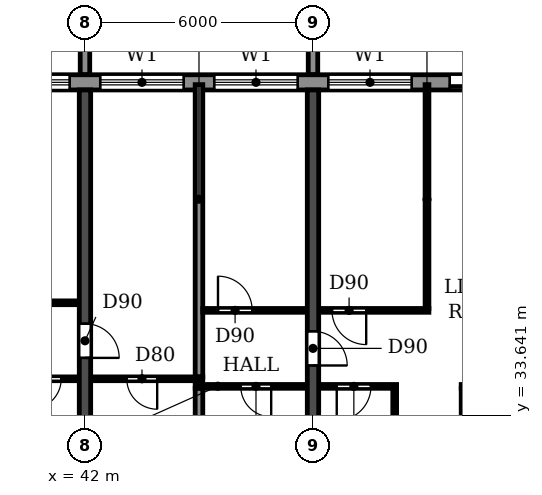
"""IFC4 building model, lengths in metres.
Left out: names, types, materials, properties, quantities, classifications, styles, units other than length and angle.
Written with IfcOpenShell. Run it as: python <this file> out.ifc"""

import sys

from ifc_helpers import new_model, si_unit, direction, frame, frame_2d, origin, place, context, subcontext, project, spatial, polyline, rectangle, outline, extrude, source, transform, mapped, element, fill, save


model = new_model("IFC4")
c1 = context("Model", 3, precision=1e-05, world=origin(), true_north=direction((0.0, 1.0)))
c2 = subcontext(c1, "Body", "Model", "MODEL_VIEW")
j1 = project(units=[si_unit("LENGTHUNIT", "METRE"), si_unit("PLANEANGLEUNIT", "RADIAN")], contexts=[c1])
p1 = place(None, origin())
s1 = spatial("IfcSite", under=j1, at=p1, CompositionType="ELEMENT")
p2 = place(p1, origin())
s2 = spatial("IfcBuilding", under=s1, at=p2, CompositionType="ELEMENT")
p3 = place(p2, frame((0.0, 0.0, 142.2)))
s3 = spatial("IfcBuildingStorey", under=s2, at=p3, CompositionType="ELEMENT", Elevation=142.2)
p4 = place(p3, frame((42.0, 30.525, 0.0), z_axis=(0.0, 0.0, 1.0), x_axis=(0.0, 1.0, 0.0)))
e1 = element("IfcWall", 1, at=p4, inside=s3, PredefinedType="SHEAR", context=c2, shape_type="SweptSolid", body=[
    extrude(rectangle(XDim=11.675, YDim=0.3, at=frame_2d((5.837, 0.0))), origin(), (0.0, 0.0, 1.0), 3.07),
])
p5 = place(p4, frame((4.625, 0.0, 0.0)))
e2 = element("IfcOpeningElement", 2, at=p5, cuts=e1, PredefinedType="OPENING", context=c2, shape_type="SweptSolid", body=[
    extrude(rectangle(XDim=0.9, YDim=2.1, at=frame_2d((0.45, 1.05))), frame((0.0, 0.16, 0.0), z_axis=(0.0, -1.0, 0.0), x_axis=(1.0, 0.0, 0.0)), (0.0, 0.0, 1.0), 0.32),
])
p6 = place(p3, frame((48.0, 30.525, 0.0), z_axis=(0.0, 0.0, 1.0), x_axis=(0.0, 1.0, 0.0)))
e3 = element("IfcWall", 3, at=p6, inside=s3, PredefinedType="SHEAR", context=c2, shape_type="SweptSolid", body=[
    extrude(rectangle(XDim=11.675, YDim=0.3, at=frame_2d((5.837, 0.0))), origin(), (0.0, 0.0, 1.0), 3.07),
])
p7 = place(p6, frame((4.425, 0.0, 0.0)))
e4 = element("IfcOpeningElement", 4, at=p7, cuts=e3, PredefinedType="OPENING", context=c2, shape_type="SweptSolid", body=[
    extrude(rectangle(XDim=0.9, YDim=2.1, at=frame_2d((0.45, 1.05))), frame((0.0, 0.16, 0.0), z_axis=(0.0, -1.0, 0.0), x_axis=(1.0, 0.0, 0.0)), (0.0, 0.0, 1.0), 0.32),
])
p8 = place(p3, frame((85.317, 42.4, 0.0), z_axis=(0.0, 0.0, 1.0), x_axis=(-1.0, 0.0, 0.0)))
e5 = element("IfcWall", 5, at=p8, inside=s3, PredefinedType="STANDARD", context=c2, shape_type="SweptSolid", body=[
    extrude(rectangle(XDim=68.634, YDim=0.4, at=frame_2d((34.317, 0.0))), origin(), (0.0, 0.0, 1.0), 3.07),
])
p9 = place(p8, frame((64.717, 0.0, 0.9)))
e6 = element("IfcOpeningElement", 6, at=p9, cuts=e5, PredefinedType="OPENING", context=c2, shape_type="SweptSolid", body=[
    extrude(rectangle(XDim=2.2, YDim=1.5, at=frame_2d((1.1, 0.75))), frame((0.0, 0.21, 0.0), z_axis=(0.0, -1.0, 0.0), x_axis=(1.0, 0.0, 0.0)), (0.0, 0.0, 1.0), 0.42),
])
p10 = place(p8, frame((61.917, 0.0, 0.0)))
e7 = element("IfcOpeningElement", 7, at=p10, cuts=e5, PredefinedType="OPENING", context=c2, shape_type="SweptSolid", body=[
    extrude(rectangle(XDim=1.8, YDim=2.4, at=frame_2d((0.9, 1.2))), frame((0.0, 0.21, 0.0), z_axis=(0.0, -1.0, 0.0), x_axis=(1.0, 0.0, 0.0)), (0.0, 0.0, 1.0), 0.42),
])
p11 = place(p8, frame((58.717, 0.0, 0.9)))
e8 = element("IfcOpeningElement", 8, at=p11, cuts=e5, PredefinedType="OPENING", context=c2, shape_type="SweptSolid", body=[
    extrude(rectangle(XDim=2.2, YDim=1.5, at=frame_2d((1.1, 0.75))), frame((0.0, 0.21, 0.0), z_axis=(0.0, -1.0, 0.0), x_axis=(1.0, 0.0, 0.0)), (0.0, 0.0, 1.0), 0.42),
])
p12 = place(p8, frame((55.917, 0.0, 0.0)))
e9 = element("IfcOpeningElement", 9, at=p12, cuts=e5, PredefinedType="OPENING", context=c2, shape_type="SweptSolid", body=[
    extrude(rectangle(XDim=1.8, YDim=2.4, at=frame_2d((0.9, 1.2))), frame((0.0, 0.21, 0.0), z_axis=(0.0, -1.0, 0.0), x_axis=(1.0, 0.0, 0.0)), (0.0, 0.0, 1.0), 0.42),
])
p13 = place(p8, frame((52.717, 0.0, 0.9)))
e10 = element("IfcOpeningElement", 10, at=p13, cuts=e5, PredefinedType="OPENING", context=c2, shape_type="SweptSolid", body=[
    extrude(rectangle(XDim=2.2, YDim=1.5, at=frame_2d((1.1, 0.75))), frame((0.0, 0.21, 0.0), z_axis=(0.0, -1.0, 0.0), x_axis=(1.0, 0.0, 0.0)), (0.0, 0.0, 1.0), 0.42),
])
p14 = place(p8, frame((49.717, 0.0, 0.9)))
e11 = element("IfcOpeningElement", 11, at=p14, cuts=e5, PredefinedType="OPENING", context=c2, shape_type="SweptSolid", body=[
    extrude(rectangle(XDim=2.2, YDim=1.5, at=frame_2d((1.1, 0.75))), frame((0.0, 0.21, 0.0), z_axis=(0.0, -1.0, 0.0), x_axis=(1.0, 0.0, 0.0)), (0.0, 0.0, 1.0), 0.42),
])
p15 = place(p8, frame((46.917, 0.0, 0.0)))
e12 = element("IfcOpeningElement", 12, at=p15, cuts=e5, PredefinedType="OPENING", context=c2, shape_type="SweptSolid", body=[
    extrude(rectangle(XDim=1.8, YDim=2.4, at=frame_2d((0.9, 1.2))), frame((0.0, 0.21, 0.0), z_axis=(0.0, -1.0, 0.0), x_axis=(1.0, 0.0, 0.0)), (0.0, 0.0, 1.0), 0.42),
])
p16 = place(p8, frame((43.717, 0.0, 0.9)))
e13 = element("IfcOpeningElement", 13, at=p16, cuts=e5, PredefinedType="OPENING", context=c2, shape_type="SweptSolid", body=[
    extrude(rectangle(XDim=2.2, YDim=1.5, at=frame_2d((1.1, 0.75))), frame((0.0, 0.21, 0.0), z_axis=(0.0, -1.0, 0.0), x_axis=(1.0, 0.0, 0.0)), (0.0, 0.0, 1.0), 0.42),
])
p17 = place(p8, frame((40.717, 0.0, 0.9)))
e14 = element("IfcOpeningElement", 14, at=p17, cuts=e5, PredefinedType="OPENING", context=c2, shape_type="SweptSolid", body=[
    extrude(rectangle(XDim=2.2, YDim=1.5, at=frame_2d((1.1, 0.75))), frame((0.0, 0.21, 0.0), z_axis=(0.0, -1.0, 0.0), x_axis=(1.0, 0.0, 0.0)), (0.0, 0.0, 1.0), 0.42),
])
p18 = place(p8, frame((37.717, 0.0, 0.9)))
e15 = element("IfcOpeningElement", 15, at=p18, cuts=e5, PredefinedType="OPENING", context=c2, shape_type="SweptSolid", body=[
    extrude(rectangle(XDim=2.2, YDim=1.5, at=frame_2d((1.1, 0.75))), frame((0.0, 0.21, 0.0), z_axis=(0.0, -1.0, 0.0), x_axis=(1.0, 0.0, 0.0)), (0.0, 0.0, 1.0), 0.42),
])
p19 = place(p8, frame((34.717, 0.0, 0.9)))
e16 = element("IfcOpeningElement", 16, at=p19, cuts=e5, PredefinedType="OPENING", context=c2, shape_type="SweptSolid", body=[
    extrude(rectangle(XDim=2.2, YDim=1.5, at=frame_2d((1.1, 0.75))), frame((0.0, 0.21, 0.0), z_axis=(0.0, -1.0, 0.0), x_axis=(1.0, 0.0, 0.0)), (0.0, 0.0, 1.0), 0.42),
])
p20 = place(p8, frame((31.917, 0.0, 0.0)))
e17 = element("IfcOpeningElement", 17, at=p20, cuts=e5, PredefinedType="OPENING", context=c2, shape_type="SweptSolid", body=[
    extrude(rectangle(XDim=1.8, YDim=2.4, at=frame_2d((0.9, 1.2))), frame((0.0, 0.21, 0.0), z_axis=(0.0, -1.0, 0.0), x_axis=(1.0, 0.0, 0.0)), (0.0, 0.0, 1.0), 0.42),
])
p21 = place(p8, frame((28.917, 0.0, 0.0)))
e18 = element("IfcOpeningElement", 18, at=p21, cuts=e5, PredefinedType="OPENING", context=c2, shape_type="SweptSolid", body=[
    extrude(rectangle(XDim=1.8, YDim=2.4, at=frame_2d((0.9, 1.2))), frame((0.0, 0.21, 0.0), z_axis=(0.0, -1.0, 0.0), x_axis=(1.0, 0.0, 0.0)), (0.0, 0.0, 1.0), 0.42),
])
p22 = place(p8, frame((25.717, 0.0, 0.9)))
e19 = element("IfcOpeningElement", 19, at=p22, cuts=e5, PredefinedType="OPENING", context=c2, shape_type="SweptSolid", body=[
    extrude(rectangle(XDim=2.2, YDim=1.5, at=frame_2d((1.1, 0.75))), frame((0.0, 0.21, 0.0), z_axis=(0.0, -1.0, 0.0), x_axis=(1.0, 0.0, 0.0)), (0.0, 0.0, 1.0), 0.42),
])
p23 = place(p8, frame((22.717, 0.0, 0.9)))
e20 = element("IfcOpeningElement", 20, at=p23, cuts=e5, PredefinedType="OPENING", context=c2, shape_type="SweptSolid", body=[
    extrude(rectangle(XDim=2.2, YDim=1.5, at=frame_2d((1.1, 0.75))), frame((0.0, 0.21, 0.0), z_axis=(0.0, -1.0, 0.0), x_axis=(1.0, 0.0, 0.0)), (0.0, 0.0, 1.0), 0.42),
])
p24 = place(p8, frame((19.717, 0.0, 0.9)))
e21 = element("IfcOpeningElement", 21, at=p24, cuts=e5, PredefinedType="OPENING", context=c2, shape_type="SweptSolid", body=[
    extrude(rectangle(XDim=2.2, YDim=1.5, at=frame_2d((1.1, 0.75))), frame((0.0, 0.21, 0.0), z_axis=(0.0, -1.0, 0.0), x_axis=(1.0, 0.0, 0.0)), (0.0, 0.0, 1.0), 0.42),
])
p25 = place(p8, frame((16.717, 0.0, 0.9)))
e22 = element("IfcOpeningElement", 22, at=p25, cuts=e5, PredefinedType="OPENING", context=c2, shape_type="SweptSolid", body=[
    extrude(rectangle(XDim=2.2, YDim=1.5, at=frame_2d((1.1, 0.75))), frame((0.0, 0.21, 0.0), z_axis=(0.0, -1.0, 0.0), x_axis=(1.0, 0.0, 0.0)), (0.0, 0.0, 1.0), 0.42),
])
p26 = place(p8, frame((13.917, 0.0, 0.0)))
e23 = element("IfcOpeningElement", 23, at=p26, cuts=e5, PredefinedType="OPENING", context=c2, shape_type="SweptSolid", body=[
    extrude(rectangle(XDim=1.8, YDim=2.4, at=frame_2d((0.9, 1.2))), frame((0.0, 0.21, 0.0), z_axis=(0.0, -1.0, 0.0), x_axis=(1.0, 0.0, 0.0)), (0.0, 0.0, 1.0), 0.42),
])
p27 = place(p8, frame((10.917, 0.0, 0.0)))
e24 = element("IfcOpeningElement", 24, at=p27, cuts=e5, PredefinedType="OPENING", context=c2, shape_type="SweptSolid", body=[
    extrude(rectangle(XDim=1.8, YDim=2.4, at=frame_2d((0.9, 1.2))), frame((0.0, 0.21, 0.0), z_axis=(0.0, -1.0, 0.0), x_axis=(1.0, 0.0, 0.0)), (0.0, 0.0, 1.0), 0.42),
])
p28 = place(p8, frame((7.717, 0.0, 0.9)))
e25 = element("IfcOpeningElement", 25, at=p28, cuts=e5, PredefinedType="OPENING", context=c2, shape_type="SweptSolid", body=[
    extrude(rectangle(XDim=2.2, YDim=1.5, at=frame_2d((1.1, 0.75))), frame((0.0, 0.21, 0.0), z_axis=(0.0, -1.0, 0.0), x_axis=(1.0, 0.0, 0.0)), (0.0, 0.0, 1.0), 0.42),
])
p29 = place(p8, frame((4.717, 0.0, 0.9)))
e26 = element("IfcOpeningElement", 26, at=p29, cuts=e5, PredefinedType="OPENING", context=c2, shape_type="SweptSolid", body=[
    extrude(rectangle(XDim=2.2, YDim=1.5, at=frame_2d((1.1, 0.75))), frame((0.0, 0.21, 0.0), z_axis=(0.0, -1.0, 0.0), x_axis=(1.0, 0.0, 0.0)), (0.0, 0.0, 1.0), 0.42),
])
p30 = place(p8, frame((1.917, 0.0, 0.0)))
e27 = element("IfcOpeningElement", 27, at=p30, cuts=e5, PredefinedType="OPENING", context=c2, shape_type="SweptSolid", body=[
    extrude(rectangle(XDim=1.8, YDim=2.4, at=frame_2d((0.9, 1.2))), frame((0.0, 0.21, 0.0), z_axis=(0.0, -1.0, 0.0), x_axis=(1.0, 0.0, 0.0)), (0.0, 0.0, 1.0), 0.42),
])
m1 = source(origin(), c2, "Body", "SweptSolid", [
    extrude(outline(polyline([(0.0, 0.0), (0.25, 0.0), (0.25, 3.1), (0.0, 3.1), (0.0, 0.0)])), origin(), (0.0, 0.0, 1.0), 3.1),
])
for number, where in (
    (28, (41.875, 42.6, 0.0)),
    (29, (47.875, 42.6, 0.0)),
):
    element("IfcWall", number, at=place(p3, frame(where)), inside=s3, PredefinedType="STANDARD", context=c2, shape_type="MappedRepresentation", body=[
        mapped(m1, transform((0.0, 0.0, 0.0))),
    ])
p31 = place(p3, frame((45.0, 30.535, 0.0), z_axis=(0.0, 0.0, 1.0), x_axis=(0.0, 1.0, 0.0)))
e30 = element("IfcWall", 30, at=p31, inside=s3, PredefinedType="PARTITIONING", context=c2, shape_type="SweptSolid", body=[
    extrude(rectangle(XDim=3.815, YDim=0.2, at=frame_2d((1.908, 0.0))), origin(), (0.0, 0.0, 1.0), 3.07),
])
p32 = place(p3, frame((45.0, 34.65, 0.0), z_axis=(0.0, 0.0, 1.0), x_axis=(0.0, 1.0, 0.0)))
e31 = element("IfcWall", 31, at=p32, inside=s3, PredefinedType="PARTITIONING", context=c2, shape_type="SweptSolid", body=[
    extrude(rectangle(XDim=7.69, YDim=0.2, at=frame_2d((3.845, 0.0))), origin(), (0.0, 0.0, 1.0), 3.07),
])
p33 = place(p3, frame((44.9, 34.4, 0.0), z_axis=(0.0, 0.0, 1.0), x_axis=(1.0, 0.0, 0.0)))
e32 = element("IfcWall", 32, at=p33, inside=s3, PredefinedType="PARTITIONING", context=c2, shape_type="SweptSolid", body=[
    extrude(rectangle(XDim=2.94, YDim=0.1, at=frame_2d((1.47, 0.0))), origin(), (0.0, 0.0, 1.0), 3.07),
])
p34 = place(p33, frame((1.2, 0.0, 0.0)))
e33 = element("IfcOpeningElement", 33, at=p34, cuts=e32, PredefinedType="OPENING", context=c2, shape_type="SweptSolid", body=[
    extrude(rectangle(XDim=0.8, YDim=2.1, at=frame_2d((0.4, 1.05))), frame((0.0, 0.06, 0.0), z_axis=(0.0, -1.0, 0.0), x_axis=(1.0, 0.0, 0.0)), (0.0, 0.0, 1.0), 0.12),
])
p35 = place(p3, frame((48.16, 34.4, 0.0), z_axis=(0.0, 0.0, 1.0), x_axis=(1.0, 0.0, 0.0)))
e34 = element("IfcWall", 34, at=p35, inside=s3, PredefinedType="PARTITIONING", context=c2, shape_type="SweptSolid", body=[
    extrude(rectangle(XDim=2.04, YDim=0.1, at=frame_2d((1.02, 0.0))), origin(), (0.0, 0.0, 1.0), 3.07),
])
p36 = place(p35, frame((0.465, 0.0, 0.0)))
e35 = element("IfcOpeningElement", 35, at=p36, cuts=e34, PredefinedType="OPENING", context=c2, shape_type="SweptSolid", body=[
    extrude(rectangle(XDim=0.9, YDim=2.1, at=frame_2d((0.45, 1.05))), frame((0.0, 0.06, 0.0), z_axis=(0.0, -1.0, 0.0), x_axis=(1.0, 0.0, 0.0)), (0.0, 0.0, 1.0), 0.12),
])
p37 = place(p3, frame((51.9, 34.4, 0.0), z_axis=(0.0, 0.0, 1.0), x_axis=(1.0, 0.0, 0.0)))
e36 = element("IfcWall", 36, at=p37, inside=s3, PredefinedType="PARTITIONING", context=c2, shape_type="SweptSolid", body=[
    extrude(rectangle(XDim=1.94, YDim=0.1, at=frame_2d((0.97, 0.0))), origin(), (0.0, 0.0, 1.0), 3.07),
])
p38 = place(p37, frame((0.675, 0.0, 0.0)))
e37 = element("IfcOpeningElement", 37, at=p38, cuts=e36, PredefinedType="OPENING", context=c2, shape_type="SweptSolid", body=[
    extrude(rectangle(XDim=0.8, YDim=2.1, at=frame_2d((0.4, 1.05))), frame((0.0, 0.06, 0.0), z_axis=(0.0, -1.0, 0.0), x_axis=(1.0, 0.0, 0.0)), (0.0, 0.0, 1.0), 0.12),
])
p39 = place(p3, frame((39.9, 34.6, 0.0), z_axis=(0.0, 0.0, 1.0), x_axis=(1.0, 0.0, 0.0)))
e38 = element("IfcWall", 38, at=p39, inside=s3, PredefinedType="PARTITIONING", context=c2, shape_type="SweptSolid", body=[
    extrude(rectangle(XDim=1.94, YDim=0.1, at=frame_2d((0.97, 0.0))), origin(), (0.0, 0.0, 1.0), 3.07),
])
p40 = place(p39, frame((0.675, 0.0, 0.0)))
e39 = element("IfcOpeningElement", 39, at=p40, cuts=e38, PredefinedType="OPENING", context=c2, shape_type="SweptSolid", body=[
    extrude(rectangle(XDim=0.8, YDim=2.1, at=frame_2d((0.4, 1.05))), frame((0.0, 0.06, 0.0), z_axis=(0.0, -1.0, 0.0), x_axis=(1.0, 0.0, 0.0)), (0.0, 0.0, 1.0), 0.12),
])
p41 = place(p3, frame((42.16, 34.6, 0.0), z_axis=(0.0, 0.0, 1.0), x_axis=(1.0, 0.0, 0.0)))
e40 = element("IfcWall", 40, at=p41, inside=s3, PredefinedType="PARTITIONING", context=c2, shape_type="SweptSolid", body=[
    extrude(rectangle(XDim=2.94, YDim=0.1, at=frame_2d((1.47, 0.0))), origin(), (0.0, 0.0, 1.0), 3.07),
])
p42 = place(p41, frame((0.94, 0.0, 0.0)))
e41 = element("IfcOpeningElement", 41, at=p42, cuts=e40, PredefinedType="OPENING", context=c2, shape_type="SweptSolid", body=[
    extrude(rectangle(XDim=0.8, YDim=2.1, at=frame_2d((0.4, 1.05))), frame((0.0, 0.06, 0.0), z_axis=(0.0, -1.0, 0.0), x_axis=(1.0, 0.0, 0.0)), (0.0, 0.0, 1.0), 0.12),
])
p43 = place(p3, frame((45.1, 36.4, 0.0), z_axis=(0.0, 0.0, 1.0), x_axis=(1.0, 0.0, 0.0)))
e42 = element("IfcWall", 42, at=p43, inside=s3, PredefinedType="PARTITIONING", context=c2, shape_type="SweptSolid", body=[
    extrude(rectangle(XDim=2.74, YDim=0.1, at=frame_2d((1.37, 0.0))), origin(), (0.0, 0.0, 1.0), 3.07),
])
p44 = place(p43, frame((0.4, 0.0, 0.0)))
e43 = element("IfcOpeningElement", 43, at=p44, cuts=e42, PredefinedType="OPENING", context=c2, shape_type="SweptSolid", body=[
    extrude(rectangle(XDim=0.9, YDim=2.1, at=frame_2d((0.45, 1.05))), frame((0.0, 0.06, 0.0), z_axis=(0.0, -1.0, 0.0), x_axis=(1.0, 0.0, 0.0)), (0.0, 0.0, 1.0), 0.12),
])
p45 = place(p3, frame((48.16, 36.4, 0.0), z_axis=(0.0, 0.0, 1.0), x_axis=(1.0, 0.0, 0.0)))
e44 = element("IfcWall", 44, at=p45, inside=s3, PredefinedType="PARTITIONING", context=c2, shape_type="SweptSolid", body=[
    extrude(rectangle(XDim=2.89, YDim=0.1, at=frame_2d((1.445, 0.0))), origin(), (0.0, 0.0, 1.0), 3.07),
])
p46 = place(p45, frame((0.34, 0.0, 0.0)))
e45 = element("IfcOpeningElement", 45, at=p46, cuts=e44, PredefinedType="OPENING", context=c2, shape_type="SweptSolid", body=[
    extrude(rectangle(XDim=0.9, YDim=2.1, at=frame_2d((0.45, 1.05))), frame((0.0, 0.06, 0.0), z_axis=(0.0, -1.0, 0.0), x_axis=(1.0, 0.0, 0.0)), (0.0, 0.0, 1.0), 0.12),
])
p47 = place(p3, frame((38.95, 36.6, 0.0), z_axis=(0.0, 0.0, 1.0), x_axis=(1.0, 0.0, 0.0)))
e46 = element("IfcWall", 46, at=p47, inside=s3, PredefinedType="PARTITIONING", context=c2, shape_type="SweptSolid", body=[
    extrude(rectangle(XDim=2.89, YDim=0.1, at=frame_2d((1.445, 0.0))), origin(), (0.0, 0.0, 1.0), 3.07),
])
p48 = place(p47, frame((0.55, 0.0, 0.0)))
e47 = element("IfcOpeningElement", 47, at=p48, cuts=e46, PredefinedType="OPENING", context=c2, shape_type="SweptSolid", body=[
    extrude(rectangle(XDim=0.9, YDim=2.1, at=frame_2d((0.45, 1.05))), frame((0.0, 0.06, 0.0), z_axis=(0.0, -1.0, 0.0), x_axis=(1.0, 0.0, 0.0)), (0.0, 0.0, 1.0), 0.12),
])
p49 = place(p3, frame((50.15, 30.535, 0.0), z_axis=(0.0, 0.0, 1.0), x_axis=(0.0, 1.0, 0.0)))
e48 = element("IfcWall", 48, at=p49, inside=s3, PredefinedType="PARTITIONING", context=c2, shape_type="SweptSolid", body=[
    extrude(rectangle(XDim=3.815, YDim=0.1, at=frame_2d((1.908, 0.0))), origin(), (0.0, 0.0, 1.0), 3.07),
])
p50 = place(p3, frame((51.0, 36.45, 0.0), z_axis=(0.0, 0.0, 1.0), x_axis=(0.0, 1.0, 0.0)))
e49 = element("IfcWall", 49, at=p50, inside=s3, PredefinedType="PARTITIONING", context=c2, shape_type="SweptSolid", body=[
    extrude(rectangle(XDim=5.89, YDim=0.1, at=frame_2d((2.945, 0.0))), origin(), (0.0, 0.0, 1.0), 3.07),
])
p51 = place(p3, frame((51.95, 30.535, 0.0), z_axis=(0.0, 0.0, 1.0), x_axis=(0.0, 1.0, 0.0)))
e50 = element("IfcWall", 50, at=p51, inside=s3, PredefinedType="PARTITIONING", context=c2, shape_type="SweptSolid", body=[
    extrude(rectangle(XDim=3.815, YDim=0.1, at=frame_2d((1.908, 0.0))), origin(), (0.0, 0.0, 1.0), 3.07),
])
p52 = place(p16, origin())
e51 = element("IfcWindow", 51, at=p52, inside=s3, PartitioningType="DOUBLE_PANEL_HORIZONTAL", PredefinedType="WINDOW", context=c2, shape_type="SweptSolid", body=[
    extrude(rectangle(XDim=2.2, YDim=1.5, at=frame_2d((1.1, 0.75))), frame((0.0, 0.03, 0.0), z_axis=(0.0, -1.0, 0.0), x_axis=(1.0, 0.0, 0.0)), (0.0, 0.0, 1.0), 0.06),
])
fill(e13, e51)
p53 = place(p17, origin())
e52 = element("IfcWindow", 52, at=p53, inside=s3, PartitioningType="DOUBLE_PANEL_HORIZONTAL", PredefinedType="WINDOW", context=c2, shape_type="SweptSolid", body=[
    extrude(rectangle(XDim=2.2, YDim=1.5, at=frame_2d((1.1, 0.75))), frame((0.0, 0.03, 0.0), z_axis=(0.0, -1.0, 0.0), x_axis=(1.0, 0.0, 0.0)), (0.0, 0.0, 1.0), 0.06),
])
fill(e14, e52)
p54 = place(p18, origin())
e53 = element("IfcWindow", 53, at=p54, inside=s3, PartitioningType="DOUBLE_PANEL_HORIZONTAL", PredefinedType="WINDOW", context=c2, shape_type="SweptSolid", body=[
    extrude(rectangle(XDim=2.2, YDim=1.5, at=frame_2d((1.1, 0.75))), frame((0.0, 0.03, 0.0), z_axis=(0.0, -1.0, 0.0), x_axis=(1.0, 0.0, 0.0)), (0.0, 0.0, 1.0), 0.06),
])
fill(e15, e53)
p55 = place(p19, origin())
e54 = element("IfcWindow", 54, at=p55, inside=s3, PartitioningType="DOUBLE_PANEL_HORIZONTAL", PredefinedType="WINDOW", context=c2, shape_type="SweptSolid", body=[
    extrude(rectangle(XDim=2.2, YDim=1.5, at=frame_2d((1.1, 0.75))), frame((0.0, 0.03, 0.0), z_axis=(0.0, -1.0, 0.0), x_axis=(1.0, 0.0, 0.0)), (0.0, 0.0, 1.0), 0.06),
])
fill(e16, e54)
p56 = place(p20, origin())
e55 = element("IfcDoor", 55, at=p56, inside=s3, OperationType="DOUBLE_DOOR_SLIDING", PredefinedType="DOOR", context=c2, shape_type="SweptSolid", body=[
    extrude(rectangle(XDim=1.8, YDim=2.4, at=frame_2d((0.9, 1.2))), frame((0.0, 0.025, 0.0), z_axis=(0.0, -1.0, 0.0), x_axis=(1.0, 0.0, 0.0)), (0.0, 0.0, 1.0), 0.05),
])
fill(e17, e55)
p57 = place(p42, frame((0.8, 0.0, 0.0), z_axis=(0.0, 0.0, 1.0), x_axis=(-1.0, 0.0, 0.0)))
e56 = element("IfcDoor", 56, at=p57, inside=s3, OperationType="SINGLE_SWING_LEFT", PredefinedType="DOOR", context=c2, shape_type="SweptSolid", body=[
    extrude(rectangle(XDim=0.8, YDim=2.1, at=frame_2d((0.4, 1.05))), frame((0.0, 0.025, 0.0), z_axis=(0.0, -1.0, 0.0), x_axis=(1.0, 0.0, 0.0)), (0.0, 0.0, 1.0), 0.05),
])
fill(e41, e56)
p58 = place(p40, frame((0.8, 0.0, 0.0), z_axis=(0.0, 0.0, 1.0), x_axis=(-1.0, 0.0, 0.0)))
e57 = element("IfcDoor", 57, at=p58, inside=s3, OperationType="SINGLE_SWING_RIGHT", PredefinedType="DOOR", context=c2, shape_type="SweptSolid", body=[
    extrude(rectangle(XDim=0.8, YDim=2.1, at=frame_2d((0.4, 1.05))), frame((0.0, 0.025, 0.0), z_axis=(0.0, -1.0, 0.0), x_axis=(1.0, 0.0, 0.0)), (0.0, 0.0, 1.0), 0.05),
])
fill(e39, e57)
p59 = place(p5, frame((0.9, 0.0, 0.0), z_axis=(0.0, 0.0, 1.0), x_axis=(-1.0, 0.0, 0.0)))
e58 = element("IfcDoor", 58, at=p59, inside=s3, OperationType="SINGLE_SWING_RIGHT", PredefinedType="DOOR", context=c2, shape_type="SweptSolid", body=[
    extrude(rectangle(XDim=0.9, YDim=2.1, at=frame_2d((0.45, 1.05))), frame((0.0, 0.025, 0.0), z_axis=(0.0, -1.0, 0.0), x_axis=(1.0, 0.0, 0.0)), (0.0, 0.0, 1.0), 0.05),
])
fill(e2, e58)
p60 = place(p44, origin())
e59 = element("IfcDoor", 59, at=p60, inside=s3, OperationType="SINGLE_SWING_LEFT", PredefinedType="DOOR", context=c2, shape_type="SweptSolid", body=[
    extrude(rectangle(XDim=0.9, YDim=2.1, at=frame_2d((0.45, 1.05))), frame((0.0, 0.025, 0.0), z_axis=(0.0, -1.0, 0.0), x_axis=(1.0, 0.0, 0.0)), (0.0, 0.0, 1.0), 0.05),
])
fill(e43, e59)
p61 = place(p34, frame((0.8, 0.0, 0.0), z_axis=(0.0, 0.0, 1.0), x_axis=(-1.0, 0.0, 0.0)))
e60 = element("IfcDoor", 60, at=p61, inside=s3, OperationType="SINGLE_SWING_LEFT", PredefinedType="DOOR", context=c2, shape_type="SweptSolid", body=[
    extrude(rectangle(XDim=0.8, YDim=2.1, at=frame_2d((0.4, 1.05))), frame((0.0, 0.025, 0.0), z_axis=(0.0, -1.0, 0.0), x_axis=(1.0, 0.0, 0.0)), (0.0, 0.0, 1.0), 0.05),
])
fill(e33, e60)
p62 = place(p7, frame((0.9, 0.0, 0.0), z_axis=(0.0, 0.0, 1.0), x_axis=(-1.0, 0.0, 0.0)))
e61 = element("IfcDoor", 61, at=p62, inside=s3, OperationType="SINGLE_SWING_RIGHT", PredefinedType="DOOR", context=c2, shape_type="SweptSolid", body=[
    extrude(rectangle(XDim=0.9, YDim=2.1, at=frame_2d((0.45, 1.05))), frame((0.0, 0.025, 0.0), z_axis=(0.0, -1.0, 0.0), x_axis=(1.0, 0.0, 0.0)), (0.0, 0.0, 1.0), 0.05),
])
fill(e4, e61)
p63 = place(p46, frame((0.9, 0.0, 0.0), z_axis=(0.0, 0.0, 1.0), x_axis=(-1.0, 0.0, 0.0)))
e62 = element("IfcDoor", 62, at=p63, inside=s3, OperationType="SINGLE_SWING_LEFT", PredefinedType="DOOR", context=c2, shape_type="SweptSolid", body=[
    extrude(rectangle(XDim=0.9, YDim=2.1, at=frame_2d((0.45, 1.05))), frame((0.0, 0.025, 0.0), z_axis=(0.0, -1.0, 0.0), x_axis=(1.0, 0.0, 0.0)), (0.0, 0.0, 1.0), 0.05),
])
fill(e45, e62)
p64 = place(p36, frame((0.9, 0.0, 0.0), z_axis=(0.0, 0.0, 1.0), x_axis=(-1.0, 0.0, 0.0)))
e63 = element("IfcDoor", 63, at=p64, inside=s3, OperationType="SINGLE_SWING_RIGHT", PredefinedType="DOOR", context=c2, shape_type="SweptSolid", body=[
    extrude(rectangle(XDim=0.9, YDim=2.1, at=frame_2d((0.45, 1.05))), frame((0.0, 0.025, 0.0), z_axis=(0.0, -1.0, 0.0), x_axis=(1.0, 0.0, 0.0)), (0.0, 0.0, 1.0), 0.05),
])
fill(e35, e63)
save(model, sys.argv[1])
